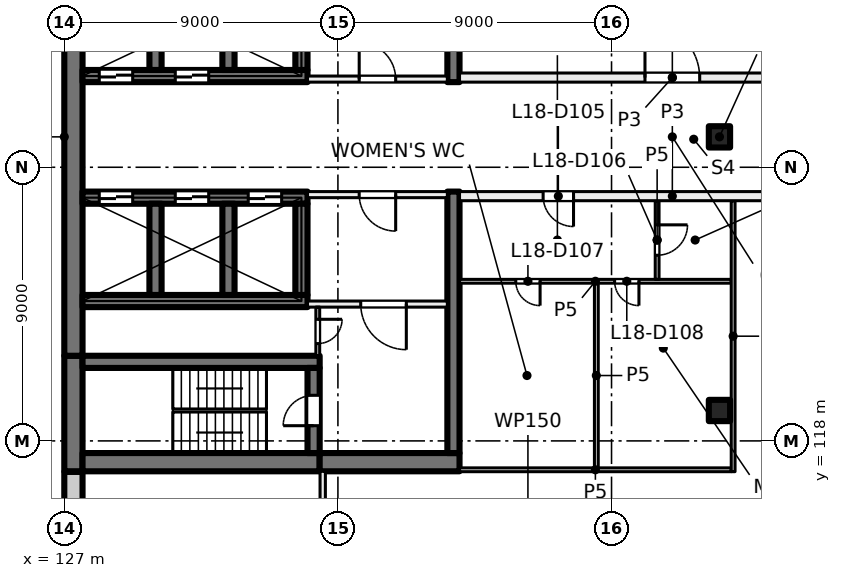
"""IFC4 building model, lengths in metres.
Left out: names, types, materials, properties, quantities, classifications, styles, units other than length and angle.
Written with IfcOpenShell. Run it as: python <this file> out.ifc"""

import sys

from ifc_helpers import new_model, si_unit, direction, frame, frame_2d, origin, origin_2d, place, context, subcontext, project, spatial, rectangle, extrude, element, fill, save


model = new_model("IFC4")
c1 = context("Model", 3, precision=1e-05, world=origin(), true_north=direction((0.0, 1.0)))
c2 = subcontext(c1, "Body", "Model", "MODEL_VIEW")
j1 = project(units=[si_unit("LENGTHUNIT", "METRE"), si_unit("PLANEANGLEUNIT", "RADIAN")], contexts=[c1])
p1 = place(None, origin())
s1 = spatial("IfcSite", under=j1, at=p1, CompositionType="ELEMENT")
p2 = place(p1, origin())
s2 = spatial("IfcBuilding", under=s1, at=p2, CompositionType="ELEMENT")
p3 = place(p2, frame((0.0, 0.0, 81.0)))
s3 = spatial("IfcBuildingStorey", under=s2, at=p3, CompositionType="ELEMENT", Elevation=81.0)
for number, where, z_axis, x_axis in (
    (1, (148.55, 119.0, 0.0), (0.0, 0.0, 1.0), (1.0, 0.0, 0.0)),
    (2, (148.55, 128.0, 0.0), (0.0, 0.0, 1.0), (1.0, 0.0, 0.0)),
):
    element("IfcColumn", number, at=place(p3, frame(where, z_axis=z_axis, x_axis=x_axis)), inside=s3, PredefinedType="COLUMN", context=c2, shape_type="SweptSolid", body=[
        extrude(rectangle(XDim=0.7, YDim=0.7, at=origin_2d()), origin(), (0.0, 0.0, 1.0), 4.0),
    ])
p4 = place(p3, frame((127.3, 117.0, 0.0), z_axis=(0.0, 0.0, 1.0), x_axis=(0.0, 1.0, 0.0)))
e3 = element("IfcWall", 3, at=p4, inside=s3, PredefinedType="SHEAR", context=c2, shape_type="SweptSolid", body=[
    extrude(rectangle(XDim=3.8, YDim=0.6, at=frame_2d((1.9, 0.0))), origin(), (0.0, 0.0, 1.0), 4.0),
])
p5 = place(p3, frame((127.3, 120.8, 0.0), z_axis=(0.0, 0.0, 1.0), x_axis=(0.0, 1.0, 0.0)))
e4 = element("IfcWall", 4, at=p5, inside=s3, PredefinedType="SHEAR", context=c2, shape_type="SweptSolid", body=[
    extrude(rectangle(XDim=14.4, YDim=0.6, at=frame_2d((7.2, 0.0))), origin(), (0.0, 0.0, 1.0), 4.0),
])
p6 = place(p3, frame((127.6, 117.3, 0.0), z_axis=(0.0, 0.0, 1.0), x_axis=(1.0, 0.0, 0.0)))
e5 = element("IfcWall", 5, at=p6, inside=s3, PredefinedType="SHEAR", context=c2, shape_type="SweptSolid", body=[
    extrude(rectangle(XDim=7.8, YDim=0.6, at=frame_2d((3.9, 0.0))), origin(), (0.0, 0.0, 1.0), 4.0),
])
p7 = place(p3, frame((135.4, 117.3, 0.0), z_axis=(0.0, 0.0, 1.0), x_axis=(1.0, 0.0, 0.0)))
e6 = element("IfcWall", 6, at=p7, inside=s3, PredefinedType="SHEAR", context=c2, shape_type="SweptSolid", body=[
    extrude(rectangle(XDim=4.6, YDim=0.6, at=frame_2d((2.3, 0.0))), origin(), (0.0, 0.0, 1.0), 4.0),
])
p8 = place(p3, frame((127.6, 120.6, 0.0), z_axis=(0.0, 0.0, 1.0), x_axis=(1.0, 0.0, 0.0)))
e7 = element("IfcWall", 7, at=p8, inside=s3, PredefinedType="SHEAR", context=c2, shape_type="SweptSolid", body=[
    extrude(rectangle(XDim=7.8, YDim=0.4, at=frame_2d((3.9, 0.0))), origin(), (0.0, 0.0, 1.0), 4.0),
])
p9 = place(p3, frame((135.2, 117.6, 0.0), z_axis=(0.0, 0.0, 1.0), x_axis=(0.0, 1.0, 0.0)))
e8 = element("IfcWall", 8, at=p9, inside=s3, PredefinedType="SHEAR", context=c2, shape_type="SweptSolid", body=[
    extrude(rectangle(XDim=2.8, YDim=0.4, at=frame_2d((1.4, 0.0))), origin(), (0.0, 0.0, 1.0), 4.0),
])
p10 = place(p9, frame((0.9, 0.0, 0.0)))
e9 = element("IfcOpeningElement", 9, at=p10, cuts=e8, PredefinedType="OPENING", context=c2, shape_type="SweptSolid", body=[
    extrude(rectangle(XDim=1.0, YDim=2.1, at=frame_2d((0.5, 1.05))), frame((0.0, 0.21, 0.0), z_axis=(0.0, -1.0, 0.0), x_axis=(1.0, 0.0, 0.0)), (0.0, 0.0, 1.0), 0.42),
])
p11 = place(p3, frame((127.6, 126.0, 0.0), z_axis=(0.0, 0.0, 1.0), x_axis=(1.0, 0.0, 0.0)))
e10 = element("IfcWall", 10, at=p11, inside=s3, PredefinedType="SHEAR", context=c2, shape_type="SweptSolid", body=[
    extrude(rectangle(XDim=7.4, YDim=0.4, at=frame_2d((3.7, 0.0))), origin(), (0.0, 0.0, 1.0), 4.0),
])
p12 = place(p11, frame((0.55, 0.0, 0.0)))
e11 = element("IfcOpeningElement", 11, at=p12, cuts=e10, PredefinedType="OPENING", context=c2, shape_type="SweptSolid", body=[
    extrude(rectangle(XDim=1.1, YDim=2.1, at=frame_2d((0.55, 1.05))), frame((0.0, 0.21, 0.0), z_axis=(0.0, -1.0, 0.0), x_axis=(1.0, 0.0, 0.0)), (0.0, 0.0, 1.0), 0.42),
])
p13 = place(p11, frame((3.05, 0.0, 0.0)))
e12 = element("IfcOpeningElement", 12, at=p13, cuts=e10, PredefinedType="OPENING", context=c2, shape_type="SweptSolid", body=[
    extrude(rectangle(XDim=1.1, YDim=2.1, at=frame_2d((0.55, 1.05))), frame((0.0, 0.21, 0.0), z_axis=(0.0, -1.0, 0.0), x_axis=(1.0, 0.0, 0.0)), (0.0, 0.0, 1.0), 0.42),
])
p14 = place(p11, frame((5.45, 0.0, 0.0)))
e13 = element("IfcOpeningElement", 13, at=p14, cuts=e10, PredefinedType="OPENING", context=c2, shape_type="SweptSolid", body=[
    extrude(rectangle(XDim=1.1, YDim=2.1, at=frame_2d((0.55, 1.05))), frame((0.0, 0.21, 0.0), z_axis=(0.0, -1.0, 0.0), x_axis=(1.0, 0.0, 0.0)), (0.0, 0.0, 1.0), 0.42),
])
p15 = place(p3, frame((127.6, 122.6, 0.0), z_axis=(0.0, 0.0, 1.0), x_axis=(1.0, 0.0, 0.0)))
e14 = element("IfcWall", 14, at=p15, inside=s3, PredefinedType="SHEAR", context=c2, shape_type="SweptSolid", body=[
    extrude(rectangle(XDim=7.4, YDim=0.4, at=frame_2d((3.7, 0.0))), origin(), (0.0, 0.0, 1.0), 4.0),
])
for number, where, z_axis, x_axis in (
    (15, (130.0, 122.8, 0.0), (0.0, 0.0, 1.0), (0.0, 1.0, 0.0)),
    (16, (132.4, 122.8, 0.0), (0.0, 0.0, 1.0), (0.0, 1.0, 0.0)),
    (17, (134.8, 122.8, 0.0), (0.0, 0.0, 1.0), (0.0, 1.0, 0.0)),
):
    element("IfcWall", number, at=place(p3, frame(where, z_axis=z_axis, x_axis=x_axis)), inside=s3, PredefinedType="SHEAR", context=c2, shape_type="SweptSolid", body=[
        extrude(rectangle(XDim=3.0, YDim=0.4, at=frame_2d((1.5, 0.0))), origin(), (0.0, 0.0, 1.0), 4.0),
    ])
p16 = place(p3, frame((127.6, 130.0, 0.0), z_axis=(0.0, 0.0, 1.0), x_axis=(1.0, 0.0, 0.0)))
e18 = element("IfcWall", 18, at=p16, inside=s3, PredefinedType="SHEAR", context=c2, shape_type="SweptSolid", body=[
    extrude(rectangle(XDim=7.4, YDim=0.4, at=frame_2d((3.7, 0.0))), origin(), (0.0, 0.0, 1.0), 4.0),
])
p17 = place(p16, frame((0.55, 0.0, 0.0)))
e19 = element("IfcOpeningElement", 19, at=p17, cuts=e18, PredefinedType="OPENING", context=c2, shape_type="SweptSolid", body=[
    extrude(rectangle(XDim=1.1, YDim=2.1, at=frame_2d((0.55, 1.05))), frame((0.0, 0.21, 0.0), z_axis=(0.0, -1.0, 0.0), x_axis=(1.0, 0.0, 0.0)), (0.0, 0.0, 1.0), 0.42),
])
p18 = place(p16, frame((3.05, 0.0, 0.0)))
e20 = element("IfcOpeningElement", 20, at=p18, cuts=e18, PredefinedType="OPENING", context=c2, shape_type="SweptSolid", body=[
    extrude(rectangle(XDim=1.1, YDim=2.1, at=frame_2d((0.55, 1.05))), frame((0.0, 0.21, 0.0), z_axis=(0.0, -1.0, 0.0), x_axis=(1.0, 0.0, 0.0)), (0.0, 0.0, 1.0), 0.42),
])
for number, where, z_axis, x_axis in (
    (21, (130.0, 130.2, 0.0), (0.0, 0.0, 1.0), (0.0, 1.0, 0.0)),
    (22, (132.4, 130.2, 0.0), (0.0, 0.0, 1.0), (0.0, 1.0, 0.0)),
):
    element("IfcWall", number, at=place(p3, frame(where, z_axis=z_axis, x_axis=x_axis)), inside=s3, PredefinedType="SHEAR", context=c2, shape_type="SweptSolid", body=[
        extrude(rectangle(XDim=3.0, YDim=0.4, at=frame_2d((1.5, 0.0))), origin(), (0.0, 0.0, 1.0), 4.0),
    ])
p19 = place(p3, frame((134.8, 130.2, 0.0), z_axis=(0.0, 0.0, 1.0), x_axis=(0.0, 1.0, 0.0)))
e23 = element("IfcWall", 23, at=p19, inside=s3, PredefinedType="SHEAR", context=c2, shape_type="SweptSolid", body=[
    extrude(rectangle(XDim=3.0, YDim=0.4, at=frame_2d((1.5, 0.0))), origin(), (0.0, 0.0, 1.0), 4.0),
])
p20 = place(p19, frame((0.95, 0.0, 0.0)))
e24 = element("IfcOpeningElement", 24, at=p20, cuts=e23, PredefinedType="OPENING", context=c2, shape_type="SweptSolid", body=[
    extrude(rectangle(XDim=1.1, YDim=2.1, at=frame_2d((0.55, 1.05))), frame((0.0, 0.21, 0.0), z_axis=(0.0, -1.0, 0.0), x_axis=(1.0, 0.0, 0.0)), (0.0, 0.0, 1.0), 0.42),
])
for number, where, z_axis, x_axis in (
    (25, (139.8, 117.6, 0.0), (0.0, 0.0, 1.0), (0.0, 1.0, 0.0)),
    (26, (139.8, 129.8, 0.0), (0.0, 0.0, 1.0), (0.0, 1.0, 0.0)),
):
    element("IfcWall", number, at=place(p3, frame(where, z_axis=z_axis, x_axis=x_axis)), inside=s3, PredefinedType="SHEAR", context=c2, shape_type="SweptSolid", body=[
        extrude(rectangle(XDim=8.6, YDim=0.4, at=frame_2d((4.3, 0.0))), origin(), (0.0, 0.0, 1.0), 4.0),
    ])
p21 = place(p3, frame((127.3, 114.07, 0.0), z_axis=(0.0, 0.0, 1.0), x_axis=(0.0, 1.0, 0.0)))
e27 = element("IfcWall", 27, at=p21, inside=s3, PredefinedType="SOLIDWALL", context=c2, shape_type="SweptSolid", body=[
    extrude(rectangle(XDim=2.91, YDim=0.6, at=frame_2d((1.455, 0.0))), origin(), (0.0, 0.0, 1.0), 3.625),
])
p22 = place(p3, frame((135.0, 129.9, 0.0), z_axis=(0.0, 0.0, 1.0), x_axis=(1.0, 0.0, 0.0)))
e28 = element("IfcWall", 28, at=p22, inside=s3, PredefinedType="PARTITIONING", context=c2, shape_type="SweptSolid", body=[
    extrude(rectangle(XDim=4.6, YDim=0.2, at=frame_2d((2.3, 0.0))), origin(), (0.0, 0.0, 1.0), 3.625),
])
p23 = place(p22, frame((1.7, 0.0, 0.0)))
e29 = element("IfcOpeningElement", 29, at=p23, cuts=e28, PredefinedType="OPENING", context=c2, shape_type="SweptSolid", body=[
    extrude(rectangle(XDim=1.2, YDim=2.1, at=frame_2d((0.6, 1.05))), frame((0.0, 0.11, 0.0), z_axis=(0.0, -1.0, 0.0), x_axis=(1.0, 0.0, 0.0)), (0.0, 0.0, 1.0), 0.22),
])
p24 = place(p3, frame((139.6, 126.1, 0.0), z_axis=(0.0, 0.0, 1.0), x_axis=(-1.0, 0.0, 0.0)))
e30 = element("IfcWall", 30, at=p24, inside=s3, PredefinedType="PARTITIONING", context=c2, shape_type="SweptSolid", body=[
    extrude(rectangle(XDim=4.6, YDim=0.2, at=frame_2d((2.3, 0.0))), origin(), (0.0, 0.0, 1.0), 3.625),
])
p25 = place(p24, frame((1.7, 0.0, 0.0)))
e31 = element("IfcOpeningElement", 31, at=p25, cuts=e30, PredefinedType="OPENING", context=c2, shape_type="SweptSolid", body=[
    extrude(rectangle(XDim=1.2, YDim=2.1, at=frame_2d((0.6, 1.05))), frame((0.0, 0.11, 0.0), z_axis=(0.0, -1.0, 0.0), x_axis=(1.0, 0.0, 0.0)), (0.0, 0.0, 1.0), 0.22),
])
p26 = place(p3, frame((139.6, 122.5, 0.0), z_axis=(0.0, 0.0, 1.0), x_axis=(-1.0, 0.0, 0.0)))
e32 = element("IfcWall", 32, at=p26, inside=s3, PredefinedType="PARTITIONING", context=c2, shape_type="SweptSolid", body=[
    extrude(rectangle(XDim=4.6, YDim=0.2, at=frame_2d((2.3, 0.0))), origin(), (0.0, 0.0, 1.0), 3.625),
])
p27 = place(p26, frame((1.35, 0.0, 0.0)))
e33 = element("IfcOpeningElement", 33, at=p27, cuts=e32, PredefinedType="OPENING", context=c2, shape_type="SweptSolid", body=[
    extrude(rectangle(XDim=1.5, YDim=2.1, at=frame_2d((0.75, 1.05))), frame((0.0, 0.11, 0.0), z_axis=(0.0, -1.0, 0.0), x_axis=(1.0, 0.0, 0.0)), (0.0, 0.0, 1.0), 0.22),
])
p28 = place(p3, frame((135.337, 122.4, 0.0), z_axis=(0.0, 0.0, 1.0), x_axis=(0.0, -1.0, 0.0)))
e34 = element("IfcWall", 34, at=p28, inside=s3, PredefinedType="PARTITIONING", context=c2, shape_type="SweptSolid", body=[
    extrude(rectangle(XDim=1.6, YDim=0.125, at=frame_2d((0.8, 0.0))), origin(), (0.0, 0.0, 1.0), 3.625),
])
p29 = place(p28, frame((0.4, 0.0, 0.0)))
e35 = element("IfcOpeningElement", 35, at=p29, cuts=e34, PredefinedType="OPENING", context=c2, shape_type="SweptSolid", body=[
    extrude(rectangle(XDim=0.8, YDim=2.1, at=frame_2d((0.4, 1.05))), frame((0.0, 0.073, 0.0), z_axis=(0.0, -1.0, 0.0), x_axis=(1.0, 0.0, 0.0)), (0.0, 0.0, 1.0), 0.145),
])
p30 = place(p3, frame((135.5, 117.0, 0.0), z_axis=(0.0, 0.0, 1.0), x_axis=(0.0, -1.0, 0.0)))
e36 = element("IfcWall", 36, at=p30, inside=s3, PredefinedType="PARTITIONING", context=c2, shape_type="SweptSolid", body=[
    extrude(rectangle(XDim=6.4, YDim=0.175, at=frame_2d((3.2, 0.0))), origin(), (0.0, 0.0, 1.0), 3.625),
])
p31 = place(p30, frame((2.6, 0.0, 0.0)))
e37 = element("IfcOpeningElement", 37, at=p31, cuts=e36, PredefinedType="OPENING", context=c2, shape_type="SweptSolid", body=[
    extrude(rectangle(XDim=1.2, YDim=2.1, at=frame_2d((0.6, 1.05))), frame((0.0, 0.097, 0.0), z_axis=(0.0, -1.0, 0.0), x_axis=(1.0, 0.0, 0.0)), (0.0, 0.0, 1.0), 0.195),
])
p32 = place(p3, frame((140.0, 117.05, 0.0), z_axis=(0.0, 0.0, 1.0), x_axis=(1.0, 0.0, 0.0)))
e38 = element("IfcWall", 38, at=p32, inside=s3, PredefinedType="PARTITIONING", context=c2, shape_type="SweptSolid", body=[
    extrude(rectangle(XDim=8.938, YDim=0.125, at=frame_2d((4.469, 0.0))), origin(), (0.0, 0.0, 1.0), 3.625),
])
p33 = place(p3, frame((148.938, 123.25, 0.0), z_axis=(0.0, 0.0, 1.0), x_axis=(-1.0, 0.0, 0.0)))
e39 = element("IfcWall", 39, at=p33, inside=s3, PredefinedType="PARTITIONING", context=c2, shape_type="SweptSolid", body=[
    extrude(rectangle(XDim=8.938, YDim=0.125, at=frame_2d((4.469, 0.0))), origin(), (0.0, 0.0, 1.0), 3.625),
])
p34 = place(p33, frame((6.288, 0.0, 0.0)))
e40 = element("IfcOpeningElement", 40, at=p34, cuts=e39, PredefinedType="OPENING", context=c2, shape_type="SweptSolid", body=[
    extrude(rectangle(XDim=0.8, YDim=2.1, at=frame_2d((0.4, 1.05))), frame((0.0, 0.073, 0.0), z_axis=(0.0, -1.0, 0.0), x_axis=(1.0, 0.0, 0.0)), (0.0, 0.0, 1.0), 0.145),
])
p35 = place(p33, frame((3.037, 0.0, 0.0)))
e41 = element("IfcOpeningElement", 41, at=p35, cuts=e39, PredefinedType="OPENING", context=c2, shape_type="SweptSolid", body=[
    extrude(rectangle(XDim=0.8, YDim=2.1, at=frame_2d((0.4, 1.05))), frame((0.0, 0.073, 0.0), z_axis=(0.0, -1.0, 0.0), x_axis=(1.0, 0.0, 0.0)), (0.0, 0.0, 1.0), 0.145),
])
p36 = place(p3, frame((140.0, 129.95, 0.0), z_axis=(0.0, 0.0, 1.0), x_axis=(1.0, 0.0, 0.0)))
e42 = element("IfcWall", 42, at=p36, inside=s3, PredefinedType="PARTITIONING", context=c2, shape_type="SweptSolid", body=[
    extrude(rectangle(XDim=14.0, YDim=0.3, at=frame_2d((7.0, 0.0))), origin(), (0.0, 0.0, 1.0), 3.625),
])
p37 = place(p36, frame((6.1, 0.0, 0.0)))
e43 = element("IfcOpeningElement", 43, at=p37, cuts=e42, PredefinedType="OPENING", context=c2, shape_type="SweptSolid", body=[
    extrude(rectangle(XDim=1.8, YDim=2.1, at=frame_2d((0.9, 1.05))), frame((0.0, 0.16, 0.0), z_axis=(0.0, -1.0, 0.0), x_axis=(1.0, 0.0, 0.0)), (0.0, 0.0, 1.0), 0.32),
])
p38 = place(p3, frame((144.5, 117.112, 0.0), z_axis=(0.0, 0.0, 1.0), x_axis=(0.0, 1.0, 0.0)))
e44 = element("IfcWall", 44, at=p38, inside=s3, PredefinedType="PARTITIONING", context=c2, shape_type="SweptSolid", body=[
    extrude(rectangle(XDim=6.076, YDim=0.125, at=frame_2d((3.038, 0.0))), origin(), (0.0, 0.0, 1.0), 3.625),
])
p39 = place(p3, frame((146.5, 125.9, 0.0), z_axis=(0.0, 0.0, 1.0), x_axis=(0.0, -1.0, 0.0)))
e45 = element("IfcWall", 45, at=p39, inside=s3, PredefinedType="PARTITIONING", context=c2, shape_type="SweptSolid", body=[
    extrude(rectangle(XDim=2.588, YDim=0.125, at=frame_2d((1.294, 0.0))), origin(), (0.0, 0.0, 1.0), 3.625),
])
p40 = place(p39, frame((0.794, 0.0, 0.0)))
e46 = element("IfcOpeningElement", 46, at=p40, cuts=e45, PredefinedType="OPENING", context=c2, shape_type="SweptSolid", body=[
    extrude(rectangle(XDim=1.0, YDim=2.1, at=frame_2d((0.5, 1.05))), frame((0.0, 0.073, 0.0), z_axis=(0.0, -1.0, 0.0), x_axis=(1.0, 0.0, 0.0)), (0.0, 0.0, 1.0), 0.145),
])
p41 = place(p3, frame((149.0, 116.988, 0.0), z_axis=(0.0, 0.0, 1.0), x_axis=(0.0, 1.0, 0.0)))
e47 = element("IfcWall", 47, at=p41, inside=s3, PredefinedType="PARTITIONING", context=c2, shape_type="SweptSolid", body=[
    extrude(rectangle(XDim=8.912, YDim=0.125, at=frame_2d((4.456, 0.0))), origin(), (0.0, 0.0, 1.0), 3.625),
])
p42 = place(p3, frame((154.0, 126.05, 0.0), z_axis=(0.0, 0.0, 1.0), x_axis=(-1.0, 0.0, 0.0)))
e48 = element("IfcWall", 48, at=p42, inside=s3, PredefinedType="PARTITIONING", context=c2, shape_type="SweptSolid", body=[
    extrude(rectangle(XDim=14.0, YDim=0.3, at=frame_2d((7.0, 0.0))), origin(), (0.0, 0.0, 1.0), 3.625),
])
p43 = place(p42, frame((10.25, 0.0, 0.0)))
e49 = element("IfcOpeningElement", 49, at=p43, cuts=e48, PredefinedType="OPENING", context=c2, shape_type="SweptSolid", body=[
    extrude(rectangle(XDim=1.0, YDim=2.1, at=frame_2d((0.5, 1.05))), frame((0.0, 0.16, 0.0), z_axis=(0.0, -1.0, 0.0), x_axis=(1.0, 0.0, 0.0)), (0.0, 0.0, 1.0), 0.32),
])
p44 = place(p42, frame((1.6, 0.0, 0.0)))
e50 = element("IfcOpeningElement", 50, at=p44, cuts=e48, PredefinedType="OPENING", context=c2, shape_type="SweptSolid", body=[
    extrude(rectangle(XDim=1.8, YDim=2.1, at=frame_2d((0.9, 1.05))), frame((0.0, 0.16, 0.0), z_axis=(0.0, -1.0, 0.0), x_axis=(1.0, 0.0, 0.0)), (0.0, 0.0, 1.0), 0.32),
])
p45 = place(p17, origin())
e51 = element("IfcDoor", 51, at=p45, inside=s3, OperationType="DOUBLE_DOOR_SLIDING", PredefinedType="DOOR", context=c2, shape_type="SweptSolid", body=[
    extrude(rectangle(XDim=1.1, YDim=2.1, at=frame_2d((0.55, 1.05))), frame((0.0, 0.025, 0.0), z_axis=(0.0, -1.0, 0.0), x_axis=(1.0, 0.0, 0.0)), (0.0, 0.0, 1.0), 0.05),
])
fill(e19, e51)
p46 = place(p18, origin())
e52 = element("IfcDoor", 52, at=p46, inside=s3, OperationType="DOUBLE_DOOR_SLIDING", PredefinedType="DOOR", context=c2, shape_type="SweptSolid", body=[
    extrude(rectangle(XDim=1.1, YDim=2.1, at=frame_2d((0.55, 1.05))), frame((0.0, 0.025, 0.0), z_axis=(0.0, -1.0, 0.0), x_axis=(1.0, 0.0, 0.0)), (0.0, 0.0, 1.0), 0.05),
])
fill(e20, e52)
p47 = place(p12, origin())
e53 = element("IfcDoor", 53, at=p47, inside=s3, OperationType="DOUBLE_DOOR_SLIDING", PredefinedType="DOOR", context=c2, shape_type="SweptSolid", body=[
    extrude(rectangle(XDim=1.1, YDim=2.1, at=frame_2d((0.55, 1.05))), frame((0.0, 0.025, 0.0), z_axis=(0.0, -1.0, 0.0), x_axis=(1.0, 0.0, 0.0)), (0.0, 0.0, 1.0), 0.05),
])
fill(e11, e53)
p48 = place(p13, origin())
e54 = element("IfcDoor", 54, at=p48, inside=s3, OperationType="DOUBLE_DOOR_SLIDING", PredefinedType="DOOR", context=c2, shape_type="SweptSolid", body=[
    extrude(rectangle(XDim=1.1, YDim=2.1, at=frame_2d((0.55, 1.05))), frame((0.0, 0.025, 0.0), z_axis=(0.0, -1.0, 0.0), x_axis=(1.0, 0.0, 0.0)), (0.0, 0.0, 1.0), 0.05),
])
fill(e12, e54)
p49 = place(p14, origin())
e55 = element("IfcDoor", 55, at=p49, inside=s3, OperationType="DOUBLE_DOOR_SLIDING", PredefinedType="DOOR", context=c2, shape_type="SweptSolid", body=[
    extrude(rectangle(XDim=1.1, YDim=2.1, at=frame_2d((0.55, 1.05))), frame((0.0, 0.025, 0.0), z_axis=(0.0, -1.0, 0.0), x_axis=(1.0, 0.0, 0.0)), (0.0, 0.0, 1.0), 0.05),
])
fill(e13, e55)
p50 = place(p23, origin())
e56 = element("IfcDoor", 56, at=p50, inside=s3, OperationType="DOUBLE_DOOR_SINGLE_SWING", PredefinedType="DOOR", context=c2, shape_type="SweptSolid", body=[
    extrude(rectangle(XDim=1.2, YDim=2.1, at=frame_2d((0.6, 1.05))), frame((0.0, 0.025, 0.0), z_axis=(0.0, -1.0, 0.0), x_axis=(1.0, 0.0, 0.0)), (0.0, 0.0, 1.0), 0.05),
])
fill(e29, e56)
p51 = place(p25, origin())
e57 = element("IfcDoor", 57, at=p51, inside=s3, OperationType="DOUBLE_DOOR_SINGLE_SWING", PredefinedType="DOOR", context=c2, shape_type="SweptSolid", body=[
    extrude(rectangle(XDim=1.2, YDim=2.1, at=frame_2d((0.6, 1.05))), frame((0.0, 0.025, 0.0), z_axis=(0.0, -1.0, 0.0), x_axis=(1.0, 0.0, 0.0)), (0.0, 0.0, 1.0), 0.05),
])
fill(e31, e57)
p52 = place(p27, origin())
e58 = element("IfcDoor", 58, at=p52, inside=s3, OperationType="DOUBLE_DOOR_SINGLE_SWING", PredefinedType="DOOR", context=c2, shape_type="SweptSolid", body=[
    extrude(rectangle(XDim=1.5, YDim=2.1, at=frame_2d((0.75, 1.05))), frame((0.0, 0.025, 0.0), z_axis=(0.0, -1.0, 0.0), x_axis=(1.0, 0.0, 0.0)), (0.0, 0.0, 1.0), 0.05),
])
fill(e33, e58)
p53 = place(p10, origin())
e59 = element("IfcDoor", 59, at=p53, inside=s3, OperationType="SINGLE_SWING_RIGHT", PredefinedType="DOOR", context=c2, shape_type="SweptSolid", body=[
    extrude(rectangle(XDim=1.0, YDim=2.1, at=frame_2d((0.5, 1.05))), frame((0.0, 0.025, 0.0), z_axis=(0.0, -1.0, 0.0), x_axis=(1.0, 0.0, 0.0)), (0.0, 0.0, 1.0), 0.05),
])
fill(e9, e59)
p54 = place(p29, origin())
e60 = element("IfcDoor", 60, at=p54, inside=s3, OperationType="SINGLE_SWING_LEFT", PredefinedType="DOOR", context=c2, shape_type="SweptSolid", body=[
    extrude(rectangle(XDim=0.8, YDim=2.1, at=frame_2d((0.4, 1.05))), frame((0.0, 0.025, 0.0), z_axis=(0.0, -1.0, 0.0), x_axis=(1.0, 0.0, 0.0)), (0.0, 0.0, 1.0), 0.05),
])
fill(e35, e60)
p55 = place(p37, origin())
e61 = element("IfcDoor", 61, at=p55, inside=s3, OperationType="DOUBLE_DOOR_SINGLE_SWING", PredefinedType="DOOR", context=c2, shape_type="SweptSolid", body=[
    extrude(rectangle(XDim=1.8, YDim=2.1, at=frame_2d((0.9, 1.05))), frame((0.0, 0.025, 0.0), z_axis=(0.0, -1.0, 0.0), x_axis=(1.0, 0.0, 0.0)), (0.0, 0.0, 1.0), 0.05),
])
fill(e43, e61)
p56 = place(p43, origin())
e62 = element("IfcDoor", 62, at=p56, inside=s3, OperationType="SINGLE_SWING_RIGHT", PredefinedType="DOOR", context=c2, shape_type="SweptSolid", body=[
    extrude(rectangle(XDim=1.0, YDim=2.1, at=frame_2d((0.5, 1.05))), frame((0.0, 0.025, 0.0), z_axis=(0.0, -1.0, 0.0), x_axis=(1.0, 0.0, 0.0)), (0.0, 0.0, 1.0), 0.05),
])
fill(e49, e62)
p57 = place(p40, origin())
e63 = element("IfcDoor", 63, at=p57, inside=s3, OperationType="SINGLE_SWING_RIGHT", PredefinedType="DOOR", context=c2, shape_type="SweptSolid", body=[
    extrude(rectangle(XDim=1.0, YDim=2.1, at=frame_2d((0.5, 1.05))), frame((0.0, 0.025, 0.0), z_axis=(0.0, -1.0, 0.0), x_axis=(1.0, 0.0, 0.0)), (0.0, 0.0, 1.0), 0.05),
])
fill(e46, e63)
p58 = place(p34, origin())
e64 = element("IfcDoor", 64, at=p58, inside=s3, OperationType="SINGLE_SWING_RIGHT", PredefinedType="DOOR", context=c2, shape_type="SweptSolid", body=[
    extrude(rectangle(XDim=0.8, YDim=2.1, at=frame_2d((0.4, 1.05))), frame((0.0, 0.025, 0.0), z_axis=(0.0, -1.0, 0.0), x_axis=(1.0, 0.0, 0.0)), (0.0, 0.0, 1.0), 0.05),
])
fill(e40, e64)
p59 = place(p35, origin())
e65 = element("IfcDoor", 65, at=p59, inside=s3, OperationType="SINGLE_SWING_LEFT", PredefinedType="DOOR", context=c2, shape_type="SweptSolid", body=[
    extrude(rectangle(XDim=0.8, YDim=2.1, at=frame_2d((0.4, 1.05))), frame((0.0, 0.025, 0.0), z_axis=(0.0, -1.0, 0.0), x_axis=(1.0, 0.0, 0.0)), (0.0, 0.0, 1.0), 0.05),
])
fill(e41, e65)
save(model, sys.argv[1])
